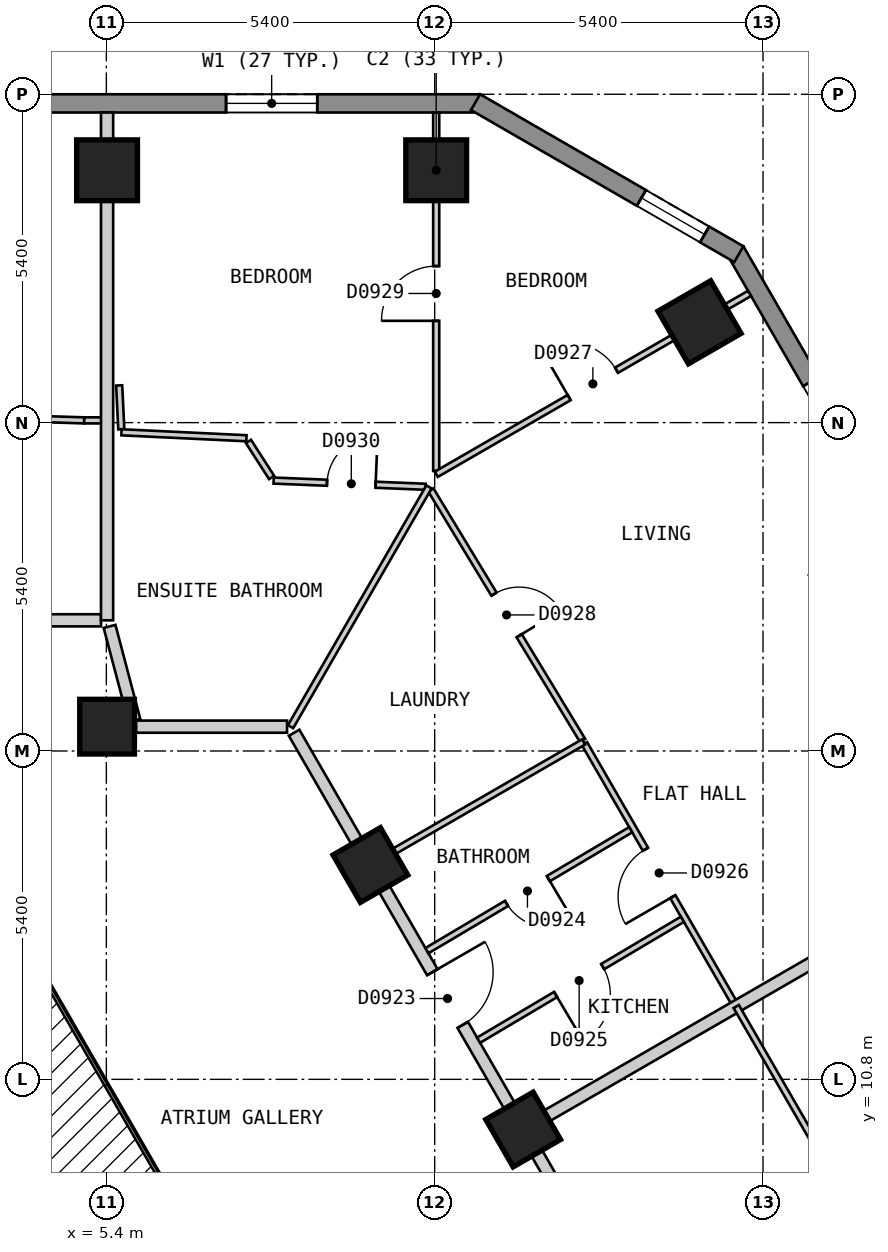
"""IFC4 building model, lengths in metres.
Left out: names, types, materials, properties, quantities, classifications, styles, units other than length and angle.
Written with IfcOpenShell. Run it as: python <this file> out.ifc"""

import sys

from ifc_helpers import new_model, si_unit, direction, frame, frame_2d, origin, origin_2d, place, context, subcontext, project, spatial, polyline, rectangle, outline, extrude, element, fill, save


model = new_model("IFC4")
c1 = context("Model", 3, precision=1e-05, world=origin(), true_north=direction((0.0, 1.0)))
c2 = subcontext(c1, "Body", "Model", "MODEL_VIEW")
j1 = project(units=[si_unit("LENGTHUNIT", "METRE"), si_unit("PLANEANGLEUNIT", "RADIAN")], contexts=[c1])
p1 = place(None, origin())
s1 = spatial("IfcSite", under=j1, at=p1, CompositionType="ELEMENT")
p2 = place(p1, origin())
s2 = spatial("IfcBuilding", under=s1, at=p2, CompositionType="ELEMENT")
p3 = place(p2, frame((0.0, 0.0, 102.0)))
s3 = spatial("IfcBuildingStorey", under=s2, at=p3, CompositionType="ELEMENT", Elevation=102.0)
for number, where, z_axis, x_axis in (
    (1, (10.825, 25.75, 0.0), (0.0, 0.0, 1.0), (-1.0, 0.0, 0.0)),
    (2, (5.412, 25.75, 0.0), (0.0, 0.0, 1.0), (-1.0, 0.0, 0.0)),
    (3, (15.156, 23.25, 0.0), (0.0, 0.0, 1.0), (-0.5, 0.866, 0.0)),
):
    element("IfcColumn", number, at=place(p3, frame(where, z_axis=z_axis, x_axis=x_axis)), inside=s3, PredefinedType="COLUMN", context=c2, shape_type="SweptSolid", body=[
        extrude(rectangle(XDim=1.0, YDim=1.0, at=origin_2d()), origin(), (0.0, 0.0, 1.0), 3.0),
    ])
for number, where, z_axis, x_axis in (
    (4, (12.255, 9.975, 0.0), (0.0, 0.0, 1.0), (-0.5, 0.866, 0.0)),
    (5, (9.743, 14.325, 0.0), (0.0, 0.0, 1.0), (-0.5, 0.866, 0.0)),
    (6, (5.412, 16.6, 0.0), (0.0, 0.0, 1.0), (-1.0, 0.0, 0.0)),
):
    element("IfcColumn", number, at=place(p3, frame(where, z_axis=z_axis, x_axis=x_axis)), inside=s3, PredefinedType="COLUMN", context=c2, shape_type="SweptSolid", body=[
        extrude(rectangle(XDim=0.9, YDim=0.9, at=origin_2d()), origin(), (0.0, 0.0, 1.0), 3.0),
    ])
p4 = place(p3, frame((11.547, 26.85, 0.0), z_axis=(0.0, 0.0, 1.0), x_axis=(-1.0, 0.0, 0.0)))
e7 = element("IfcWall", 7, at=p4, inside=s3, PredefinedType="SOLIDWALL", context=c2, shape_type="SweptSolid", body=[
    extrude(outline(polyline([(0.0, -0.15), (23.094, -0.15), (23.014, 0.15), (0.08, 0.15), (0.0, -0.15)])), origin(), (0.0, 0.0, 1.0), 2.7),
])
p5 = place(p4, frame((2.678, 0.0, 0.15)))
e8 = element("IfcOpeningElement", 8, at=p5, cuts=e7, PredefinedType="OPENING", context=c2, shape_type="SweptSolid", body=[
    extrude(rectangle(XDim=1.5, YDim=2.1, at=frame_2d((0.75, 1.05))), frame((0.0, 0.16, 0.0), z_axis=(0.0, -1.0, 0.0), x_axis=(1.0, 0.0, 0.0)), (0.0, 0.0, 1.0), 0.32),
])
p6 = place(p4, frame((8.092, 0.0, 0.15)))
e9 = element("IfcOpeningElement", 9, at=p6, cuts=e7, PredefinedType="OPENING", context=c2, shape_type="SweptSolid", body=[
    extrude(rectangle(XDim=1.5, YDim=2.1, at=frame_2d((0.75, 1.05))), frame((0.0, 0.16, 0.0), z_axis=(0.0, -1.0, 0.0), x_axis=(1.0, 0.0, 0.0)), (0.0, 0.0, 1.0), 0.32),
])
p7 = place(p4, frame((13.504, 0.0, 0.15)))
e10 = element("IfcOpeningElement", 10, at=p7, cuts=e7, PredefinedType="OPENING", context=c2, shape_type="SweptSolid", body=[
    extrude(rectangle(XDim=1.5, YDim=2.1, at=frame_2d((0.75, 1.05))), frame((0.0, 0.16, 0.0), z_axis=(0.0, -1.0, 0.0), x_axis=(1.0, 0.0, 0.0)), (0.0, 0.0, 1.0), 0.32),
])
p8 = place(p4, frame((18.917, 0.0, 0.15)))
e11 = element("IfcOpeningElement", 11, at=p8, cuts=e7, PredefinedType="OPENING", context=c2, shape_type="SweptSolid", body=[
    extrude(rectangle(XDim=1.5, YDim=2.1, at=frame_2d((0.75, 1.05))), frame((0.0, 0.16, 0.0), z_axis=(0.0, -1.0, 0.0), x_axis=(1.0, 0.0, 0.0)), (0.0, 0.0, 1.0), 0.32),
])
p9 = place(p3, frame((29.027, 1.425, 0.0), z_axis=(0.0, 0.0, 1.0), x_axis=(-0.500027479704, 0.866009537788, 0.0)))
e12 = element("IfcWall", 12, at=p9, inside=s3, PredefinedType="SOLIDWALL", context=c2, shape_type="SweptSolid", body=[
    extrude(outline(polyline([(0.0, -0.15), (26.559, -0.15), (26.478, 0.15), (0.08, 0.15), (0.0, -0.15)])), origin(), (0.0, 0.0, 1.0), 2.7),
])
p10 = place(p9, frame((2.483, 0.0, 0.15)))
e13 = element("IfcOpeningElement", 13, at=p10, cuts=e12, PredefinedType="OPENING", context=c2, shape_type="SweptSolid", body=[
    extrude(rectangle(XDim=1.5, YDim=2.1, at=frame_2d((0.75, 1.05))), frame((0.0, 0.16, 0.0), z_axis=(0.0, -1.0, 0.0), x_axis=(1.0, 0.0, 0.0)), (0.0, 0.0, 1.0), 0.32),
])
p11 = place(p9, frame((7.506, 0.0, 0.15)))
e14 = element("IfcOpeningElement", 14, at=p11, cuts=e12, PredefinedType="OPENING", context=c2, shape_type="SweptSolid", body=[
    extrude(rectangle(XDim=1.5, YDim=2.1, at=frame_2d((0.75, 1.05))), frame((0.0, 0.16, 0.0), z_axis=(0.0, -1.0, 0.0), x_axis=(1.0, 0.0, 0.0)), (0.0, 0.0, 1.0), 0.32),
])
p12 = place(p9, frame((12.529, 0.0, 0.15)))
e15 = element("IfcOpeningElement", 15, at=p12, cuts=e12, PredefinedType="OPENING", context=c2, shape_type="SweptSolid", body=[
    extrude(rectangle(XDim=1.5, YDim=2.1, at=frame_2d((0.75, 1.05))), frame((0.0, 0.16, 0.0), z_axis=(0.0, -1.0, 0.0), x_axis=(1.0, 0.0, 0.0)), (0.0, 0.0, 1.0), 0.32),
])
p13 = place(p9, frame((17.552, 0.0, 0.15)))
e16 = element("IfcOpeningElement", 16, at=p13, cuts=e12, PredefinedType="OPENING", context=c2, shape_type="SweptSolid", body=[
    extrude(rectangle(XDim=1.5, YDim=2.1, at=frame_2d((0.75, 1.05))), frame((0.0, 0.16, 0.0), z_axis=(0.0, -1.0, 0.0), x_axis=(1.0, 0.0, 0.0)), (0.0, 0.0, 1.0), 0.32),
])
p14 = place(p9, frame((22.575, 0.0, 0.15)))
e17 = element("IfcOpeningElement", 17, at=p14, cuts=e12, PredefinedType="OPENING", context=c2, shape_type="SweptSolid", body=[
    extrude(rectangle(XDim=1.5, YDim=2.1, at=frame_2d((0.75, 1.05))), frame((0.0, 0.16, 0.0), z_axis=(0.0, -1.0, 0.0), x_axis=(1.0, 0.0, 0.0)), (0.0, 0.0, 1.0), 0.32),
])
p15 = place(p3, frame((15.802, 24.37, 0.0), z_axis=(0.0, 0.0, 1.0), x_axis=(-0.866022959057, 0.500004234368, 0.0)))
e18 = element("IfcWall", 18, at=p15, inside=s3, PredefinedType="SOLIDWALL", context=c2, shape_type="SweptSolid", body=[
    extrude(outline(polyline([(0.0, -0.15), (5.0, -0.15), (4.92, 0.15), (0.08, 0.15), (0.0, -0.15)])), origin(), (0.0, 0.0, 1.0), 2.7),
])
p16 = place(p15, frame((0.65, 0.0, 0.15)))
e19 = element("IfcOpeningElement", 19, at=p16, cuts=e18, PredefinedType="OPENING", context=c2, shape_type="SweptSolid", body=[
    extrude(rectangle(XDim=1.2, YDim=2.1, at=frame_2d((0.6, 1.05))), frame((0.0, 0.16, 0.0), z_axis=(0.0, -1.0, 0.0), x_axis=(1.0, 0.0, 0.0)), (0.0, 0.0, 1.0), 0.32),
])
p17 = place(p3, frame((5.453, 18.249, 0.0), z_axis=(0.0, 0.0, 1.0), x_axis=(0.255385747764, -0.966839241983, 0.0)))
e20 = element("IfcWall", 20, at=p17, inside=s3, PredefinedType="PARTITIONING", context=c2, shape_type="SweptSolid", body=[
    extrude(rectangle(XDim=1.602, YDim=0.2, at=frame_2d((0.801, 0.0))), origin(), (0.0, 0.0, 1.0), 2.7),
])
p18 = place(p3, frame((8.488, 16.5, 0.0), z_axis=(0.0, 0.0, 1.0), x_axis=(0.499986836607, -0.86603300354, 0.0)))
e21 = element("IfcWall", 21, at=p18, inside=s3, PredefinedType="PARTITIONING", context=c2, shape_type="SweptSolid", body=[
    extrude(rectangle(XDim=20.09, YDim=0.2, at=frame_2d((10.045, 0.0))), origin(), (0.0, 0.0, 1.0), 2.7),
])
p19 = place(p18, frame((14.569, 0.0, 0.0)))
e22 = element("IfcOpeningElement", 22, at=p19, cuts=e21, PredefinedType="OPENING", context=c2, shape_type="SweptSolid", body=[
    extrude(rectangle(XDim=1.0, YDim=2.1, at=frame_2d((0.5, 1.05))), frame((0.0, 0.11, 0.0), z_axis=(0.0, -1.0, 0.0), x_axis=(1.0, 0.0, 0.0)), (0.0, 0.0, 1.0), 0.22),
])
p20 = place(p18, frame((4.547, 0.0, 0.0)))
e23 = element("IfcOpeningElement", 23, at=p20, cuts=e21, PredefinedType="OPENING", context=c2, shape_type="SweptSolid", body=[
    extrude(rectangle(XDim=1.0, YDim=2.1, at=frame_2d((0.5, 1.05))), frame((0.0, 0.11, 0.0), z_axis=(0.0, -1.0, 0.0), x_axis=(1.0, 0.0, 0.0)), (0.0, 0.0, 1.0), 0.22),
])
p21 = place(p3, frame((5.889, 16.6, 0.0), z_axis=(0.0, 0.0, 1.0), x_axis=(1.0, 0.0, 0.0)))
e24 = element("IfcWall", 24, at=p21, inside=s3, PredefinedType="PARTITIONING", context=c2, shape_type="SweptSolid", body=[
    extrude(rectangle(XDim=2.483, YDim=0.2, at=frame_2d((1.242, 0.0))), origin(), (0.0, 0.0, 1.0), 2.7),
])
p22 = place(p3, frame((1.75, 18.349, 0.0), z_axis=(0.0, 0.0, 1.0), x_axis=(1.0, 0.0, 0.0)))
e25 = element("IfcWall", 25, at=p22, inside=s3, PredefinedType="PARTITIONING", context=c2, shape_type="SweptSolid", body=[
    extrude(rectangle(XDim=3.562, YDim=0.2, at=frame_2d((1.781, 0.0))), origin(), (0.0, 0.0, 1.0), 2.7),
])
p23 = place(p3, frame((7.737, 21.291, 0.0), z_axis=(0.0, 0.0, 1.0), x_axis=(0.540389876456, -0.841414749944, 0.0)))
e26 = element("IfcWall", 26, at=p23, inside=s3, PredefinedType="PARTITIONING", context=c2, shape_type="SweptSolid", body=[
    extrude(rectangle(XDim=0.705, YDim=0.1, at=frame_2d((0.353, 0.0))), origin(), (0.0, 0.0, 1.0), 2.7),
])
p24 = place(p3, frame((10.738, 20.492, 0.0), z_axis=(0.0, 0.0, 1.0), x_axis=(0.518026330534, -0.85536467128, 0.0)))
e27 = element("IfcWall", 27, at=p24, inside=s3, PredefinedType="PARTITIONING", context=c2, shape_type="SweptSolid", body=[
    extrude(rectangle(XDim=4.814, YDim=0.1, at=frame_2d((2.407, 0.0))), origin(), (0.0, 0.0, 1.0), 2.7),
])
p25 = place(p24, frame((2.002, 0.0, 0.0)))
e28 = element("IfcOpeningElement", 28, at=p25, cuts=e27, PredefinedType="OPENING", context=c2, shape_type="SweptSolid", body=[
    extrude(rectangle(XDim=0.8, YDim=2.1, at=frame_2d((0.4, 1.05))), frame((0.0, 0.06, 0.0), z_axis=(0.0, -1.0, 0.0), x_axis=(1.0, 0.0, 0.0)), (0.0, 0.0, 1.0), 0.12),
])
p26 = place(p3, frame((13.263, 16.322, 0.0), z_axis=(0.0, 0.0, 1.0), x_axis=(0.499946798379, -0.866056117576, 0.0)))
e29 = element("IfcWall", 29, at=p26, inside=s3, PredefinedType="PARTITIONING", context=c2, shape_type="SweptSolid", body=[
    extrude(rectangle(XDim=4.993, YDim=0.1, at=frame_2d((2.496, 0.0))), origin(), (0.0, 0.0, 1.0), 2.7),
])
p27 = place(p26, frame((2.007, 0.0, 0.0)))
e30 = element("IfcOpeningElement", 30, at=p27, cuts=e29, PredefinedType="OPENING", context=c2, shape_type="SweptSolid", body=[
    extrude(rectangle(XDim=0.9, YDim=2.1, at=frame_2d((0.45, 1.05))), frame((0.0, 0.06, 0.0), z_axis=(0.0, -1.0, 0.0), x_axis=(1.0, 0.0, 0.0)), (0.0, 0.0, 1.0), 0.12),
])
p28 = place(p3, frame((5.611, 22.212, 0.0), z_axis=(0.0, 0.0, 1.0), x_axis=(0.048368650834, -0.998829551834, 0.0)))
e31 = element("IfcWall", 31, at=p28, inside=s3, PredefinedType="PARTITIONING", context=c2, shape_type="SweptSolid", body=[
    extrude(rectangle(XDim=0.722, YDim=0.1, at=frame_2d((0.361, 0.0))), origin(), (0.0, 0.0, 1.0), 2.7),
])
p29 = place(p3, frame((0.049, 21.792, 0.0), z_axis=(0.0, 0.0, 1.0), x_axis=(0.999517123417, -0.031072817652, 0.0)))
e32 = element("IfcWall", 32, at=p29, inside=s3, PredefinedType="PARTITIONING", context=c2, shape_type="SweptSolid", body=[
    extrude(rectangle(XDim=4.989, YDim=0.1, at=frame_2d((2.495, 0.0))), origin(), (0.0, 0.0, 1.0), 2.7),
])
p30 = place(p3, frame((8.151, 20.647, 0.0), z_axis=(0.0, 0.0, 1.0), x_axis=(0.999167241152, -0.040802257405, 0.0)))
e33 = element("IfcWall", 33, at=p30, inside=s3, PredefinedType="PARTITIONING", context=c2, shape_type="SweptSolid", body=[
    extrude(rectangle(XDim=2.501, YDim=0.1, at=frame_2d((1.25, 0.0))), origin(), (0.0, 0.0, 1.0), 2.7),
])
p31 = place(p30, frame((0.879, 0.0, 0.0)))
e34 = element("IfcOpeningElement", 34, at=p31, cuts=e33, PredefinedType="OPENING", context=c2, shape_type="SweptSolid", body=[
    extrude(rectangle(XDim=0.8, YDim=2.1, at=frame_2d((0.4, 1.05))), frame((0.0, 0.06, 0.0), z_axis=(0.0, -1.0, 0.0), x_axis=(1.0, 0.0, 0.0)), (0.0, 0.0, 1.0), 0.12),
])
p32 = place(p3, frame((5.649, 21.441, 0.0), z_axis=(0.0, 0.0, 1.0), x_axis=(0.998867332207, -0.047582062273, 0.0)))
e35 = element("IfcWall", 35, at=p32, inside=s3, PredefinedType="PARTITIONING", context=c2, shape_type="SweptSolid", body=[
    extrude(rectangle(XDim=2.058, YDim=0.1, at=frame_2d((1.029, 0.0))), origin(), (0.0, 0.0, 1.0), 2.7),
])
p33 = place(p3, frame((5.036, 21.637, 0.0), z_axis=(0.0, 0.0, 1.0), x_axis=(1.0, 0.0, 0.0)))
e36 = element("IfcWall", 36, at=p33, inside=s3, PredefinedType="PARTITIONING", context=c2, shape_type="SweptSolid", body=[
    extrude(rectangle(XDim=0.337, YDim=0.1, at=frame_2d((0.168, 0.0))), origin(), (0.0, 0.0, 1.0), 2.7),
])
p34 = place(p3, frame((8.43, 16.6, 0.0), z_axis=(0.0, 0.0, 1.0), x_axis=(0.499951460778, 0.866053426104, 0.0)))
e37 = element("IfcWall", 37, at=p34, inside=s3, PredefinedType="PARTITIONING", context=c2, shape_type="SweptSolid", body=[
    extrude(rectangle(XDim=4.553, YDim=0.1, at=frame_2d((2.276, 0.0))), origin(), (0.0, 0.0, 1.0), 2.7),
])
p35 = place(p3, frame((10.825, 20.806, 0.0), z_axis=(0.0, 0.0, 1.0), x_axis=(0.0, 1.0, 0.0)))
e38 = element("IfcWall", 38, at=p35, inside=s3, PredefinedType="PARTITIONING", context=c2, shape_type="SweptSolid", body=[
    extrude(rectangle(XDim=5.894, YDim=0.1, at=frame_2d((2.947, 0.0))), origin(), (0.0, 0.0, 1.0), 2.7),
])
p36 = place(p35, frame((2.468, 0.0, 0.0)))
e39 = element("IfcOpeningElement", 39, at=p36, cuts=e38, PredefinedType="OPENING", context=c2, shape_type="SweptSolid", body=[
    extrude(rectangle(XDim=0.9, YDim=2.1, at=frame_2d((0.45, 1.05))), frame((0.0, 0.06, 0.0), z_axis=(0.0, -1.0, 0.0), x_axis=(1.0, 0.0, 0.0)), (0.0, 0.0, 1.0), 0.12),
])
p37 = place(p3, frame((9.83, 14.375, 0.0), z_axis=(0.0, 0.0, 1.0), x_axis=(0.866076396086, 0.499911668341, 0.0)))
e40 = element("IfcWall", 40, at=p37, inside=s3, PredefinedType="PARTITIONING", context=c2, shape_type="SweptSolid", body=[
    extrude(rectangle(XDim=3.947, YDim=0.1, at=frame_2d((1.973, 0.0))), origin(), (0.0, 0.0, 1.0), 2.7),
])
p38 = place(p3, frame((10.826, 20.75, 0.0), z_axis=(0.0, 0.0, 1.0), x_axis=(0.865986712877, 0.50006700863, 0.0)))
e41 = element("IfcWall", 41, at=p38, inside=s3, PredefinedType="PARTITIONING", context=c2, shape_type="SweptSolid", body=[
    extrude(rectangle(XDim=5.949, YDim=0.1, at=frame_2d((2.975, 0.0))), origin(), (0.0, 0.0, 1.0), 2.7),
])
p39 = place(p38, frame((2.524, 0.0, 0.0)))
e42 = element("IfcOpeningElement", 42, at=p39, cuts=e41, PredefinedType="OPENING", context=c2, shape_type="SweptSolid", body=[
    extrude(rectangle(XDim=0.9, YDim=2.1, at=frame_2d((0.45, 1.05))), frame((0.0, 0.06, 0.0), z_axis=(0.0, -1.0, 0.0), x_axis=(1.0, 0.0, 0.0)), (0.0, 0.0, 1.0), 0.12),
])
p40 = place(p3, frame((11.522, 11.444, 0.0), z_axis=(0.0, 0.0, 1.0), x_axis=(0.860134781641, 0.510066816615, 0.0)))
e43 = element("IfcWall", 43, at=p40, inside=s3, PredefinedType="PARTITIONING", context=c2, shape_type="SweptSolid", body=[
    extrude(rectangle(XDim=3.897, YDim=0.1, at=frame_2d((1.949, 0.0))), origin(), (0.0, 0.0, 1.0), 2.7),
])
p41 = place(p40, frame((1.473, 0.0, 0.0)))
e44 = element("IfcOpeningElement", 44, at=p41, cuts=e43, PredefinedType="OPENING", context=c2, shape_type="SweptSolid", body=[
    extrude(rectangle(XDim=0.9, YDim=2.1, at=frame_2d((0.45, 1.05))), frame((0.0, 0.06, 0.0), z_axis=(0.0, -1.0, 0.0), x_axis=(1.0, 0.0, 0.0)), (0.0, 0.0, 1.0), 0.12),
])
p42 = place(p3, frame((10.672, 12.916, 0.0), z_axis=(0.0, 0.0, 1.0), x_axis=(0.859981037235, 0.510325989537, 0.0)))
e45 = element("IfcWall", 45, at=p42, inside=s3, PredefinedType="PARTITIONING", context=c2, shape_type="SweptSolid", body=[
    extrude(rectangle(XDim=3.897, YDim=0.1, at=frame_2d((1.949, 0.0))), origin(), (0.0, 0.0, 1.0), 2.7),
])
p43 = place(p42, frame((1.523, 0.0, 0.0)))
e46 = element("IfcOpeningElement", 46, at=p43, cuts=e45, PredefinedType="OPENING", context=c2, shape_type="SweptSolid", body=[
    extrude(rectangle(XDim=0.8, YDim=2.1, at=frame_2d((0.4, 1.05))), frame((0.0, 0.06, 0.0), z_axis=(0.0, -1.0, 0.0), x_axis=(1.0, 0.0, 0.0)), (0.0, 0.0, 1.0), 0.12),
])
p44 = place(p3, frame((5.412, 18.349, 0.0), z_axis=(0.0, 0.0, 1.0), x_axis=(0.0, 1.0, 0.0)))
e47 = element("IfcWall", 47, at=p44, inside=s3, PredefinedType="PARTITIONING", context=c2, shape_type="SweptSolid", body=[
    extrude(rectangle(XDim=8.351, YDim=0.2, at=frame_2d((4.175, 0.0))), origin(), (0.0, 0.0, 1.0), 2.7),
])
p45 = place(p3, frame((12.342, 10.025, 0.0), z_axis=(0.0, 0.0, 1.0), x_axis=(0.865992435864, 0.500057097767, 0.0)))
e48 = element("IfcWall", 48, at=p45, inside=s3, PredefinedType="PARTITIONING", context=c2, shape_type="SweptSolid", body=[
    extrude(rectangle(XDim=9.999, YDim=0.2, at=frame_2d((5.0, 0.0))), origin(), (0.0, 0.0, 1.0), 2.7),
])
p46 = place(p3, frame((15.759, 11.998, 0.0), z_axis=(0.0, 0.0, 1.0), x_axis=(0.500068444113, -0.865985883951, 0.0)))
e49 = element("IfcWall", 49, at=p46, inside=s3, PredefinedType="PARTITIONING", context=c2, shape_type="SweptSolid", body=[
    extrude(rectangle(XDim=9.997, YDim=0.1, at=frame_2d((4.998, 0.0))), origin(), (0.0, 0.0, 1.0), 2.7),
])
p47 = place(p46, frame((7.074, 0.0, 0.0)))
e50 = element("IfcOpeningElement", 50, at=p47, cuts=e49, PredefinedType="OPENING", context=c2, shape_type="SweptSolid", body=[
    extrude(rectangle(XDim=0.9, YDim=2.1, at=frame_2d((0.45, 1.05))), frame((0.0, 0.06, 0.0), z_axis=(0.0, -1.0, 0.0), x_axis=(1.0, 0.0, 0.0)), (0.0, 0.0, 1.0), 0.12),
])
p48 = place(p5, origin())
e51 = element("IfcWindow", 51, at=p48, inside=s3, PartitioningType="SINGLE_PANEL", PredefinedType="WINDOW", context=c2, shape_type="SweptSolid", body=[
    extrude(rectangle(XDim=1.5, YDim=2.1, at=frame_2d((0.75, 1.05))), frame((0.0, 0.03, 0.0), z_axis=(0.0, -1.0, 0.0), x_axis=(1.0, 0.0, 0.0)), (0.0, 0.0, 1.0), 0.06),
])
fill(e8, e51)
p49 = place(p16, origin())
e52 = element("IfcWindow", 52, at=p49, inside=s3, PartitioningType="SINGLE_PANEL", PredefinedType="WINDOW", context=c2, shape_type="SweptSolid", body=[
    extrude(rectangle(XDim=1.2, YDim=2.1, at=frame_2d((0.6, 1.05))), frame((0.0, 0.03, 0.0), z_axis=(0.0, -1.0, 0.0), x_axis=(1.0, 0.0, 0.0)), (0.0, 0.0, 1.0), 0.06),
])
fill(e19, e52)
p50 = place(p20, origin())
e53 = element("IfcDoor", 53, at=p50, inside=s3, OperationType="SINGLE_SWING_LEFT", PredefinedType="DOOR", context=c2, shape_type="SweptSolid", body=[
    extrude(rectangle(XDim=1.0, YDim=2.1, at=frame_2d((0.5, 1.05))), frame((0.0, 0.025, 0.0), z_axis=(0.0, -1.0, 0.0), x_axis=(1.0, 0.0, 0.0)), (0.0, 0.0, 1.0), 0.05),
])
fill(e23, e53)
p51 = place(p43, origin())
e54 = element("IfcDoor", 54, at=p51, inside=s3, OperationType="SINGLE_SWING_RIGHT", PredefinedType="DOOR", context=c2, shape_type="SweptSolid", body=[
    extrude(rectangle(XDim=0.8, YDim=2.1, at=frame_2d((0.4, 1.05))), frame((0.0, 0.025, 0.0), z_axis=(0.0, -1.0, 0.0), x_axis=(1.0, 0.0, 0.0)), (0.0, 0.0, 1.0), 0.05),
])
fill(e46, e54)
p52 = place(p41, origin())
e55 = element("IfcDoor", 55, at=p52, inside=s3, OperationType="SINGLE_SWING_LEFT", PredefinedType="DOOR", context=c2, shape_type="SweptSolid", body=[
    extrude(rectangle(XDim=0.9, YDim=2.1, at=frame_2d((0.45, 1.05))), frame((0.0, 0.025, 0.0), z_axis=(0.0, -1.0, 0.0), x_axis=(1.0, 0.0, 0.0)), (0.0, 0.0, 1.0), 0.05),
])
fill(e44, e55)
p53 = place(p27, origin())
e56 = element("IfcDoor", 56, at=p53, inside=s3, OperationType="SINGLE_SWING_RIGHT", PredefinedType="DOOR", context=c2, shape_type="SweptSolid", body=[
    extrude(rectangle(XDim=0.9, YDim=2.1, at=frame_2d((0.45, 1.05))), frame((0.0, 0.025, 0.0), z_axis=(0.0, -1.0, 0.0), x_axis=(1.0, 0.0, 0.0)), (0.0, 0.0, 1.0), 0.05),
])
fill(e30, e56)
p54 = place(p39, origin())
e57 = element("IfcDoor", 57, at=p54, inside=s3, OperationType="SINGLE_SWING_LEFT", PredefinedType="DOOR", context=c2, shape_type="SweptSolid", body=[
    extrude(rectangle(XDim=0.9, YDim=2.1, at=frame_2d((0.45, 1.05))), frame((0.0, 0.025, 0.0), z_axis=(0.0, -1.0, 0.0), x_axis=(1.0, 0.0, 0.0)), (0.0, 0.0, 1.0), 0.05),
])
fill(e42, e57)
p55 = place(p25, origin())
e58 = element("IfcDoor", 58, at=p55, inside=s3, OperationType="SINGLE_SWING_RIGHT", PredefinedType="DOOR", context=c2, shape_type="SweptSolid", body=[
    extrude(rectangle(XDim=0.8, YDim=2.1, at=frame_2d((0.4, 1.05))), frame((0.0, 0.025, 0.0), z_axis=(0.0, -1.0, 0.0), x_axis=(1.0, 0.0, 0.0)), (0.0, 0.0, 1.0), 0.05),
])
fill(e28, e58)
p56 = place(p36, origin())
e59 = element("IfcDoor", 59, at=p56, inside=s3, OperationType="SINGLE_SWING_LEFT", PredefinedType="DOOR", context=c2, shape_type="SweptSolid", body=[
    extrude(rectangle(XDim=0.9, YDim=2.1, at=frame_2d((0.45, 1.05))), frame((0.0, 0.025, 0.0), z_axis=(0.0, -1.0, 0.0), x_axis=(1.0, 0.0, 0.0)), (0.0, 0.0, 1.0), 0.05),
])
fill(e39, e59)
p57 = place(p31, origin())
e60 = element("IfcDoor", 60, at=p57, inside=s3, OperationType="SINGLE_SWING_RIGHT", PredefinedType="DOOR", context=c2, shape_type="SweptSolid", body=[
    extrude(rectangle(XDim=0.8, YDim=2.1, at=frame_2d((0.4, 1.05))), frame((0.0, 0.025, 0.0), z_axis=(0.0, -1.0, 0.0), x_axis=(1.0, 0.0, 0.0)), (0.0, 0.0, 1.0), 0.05),
])
fill(e34, e60)
save(model, sys.argv[1])
